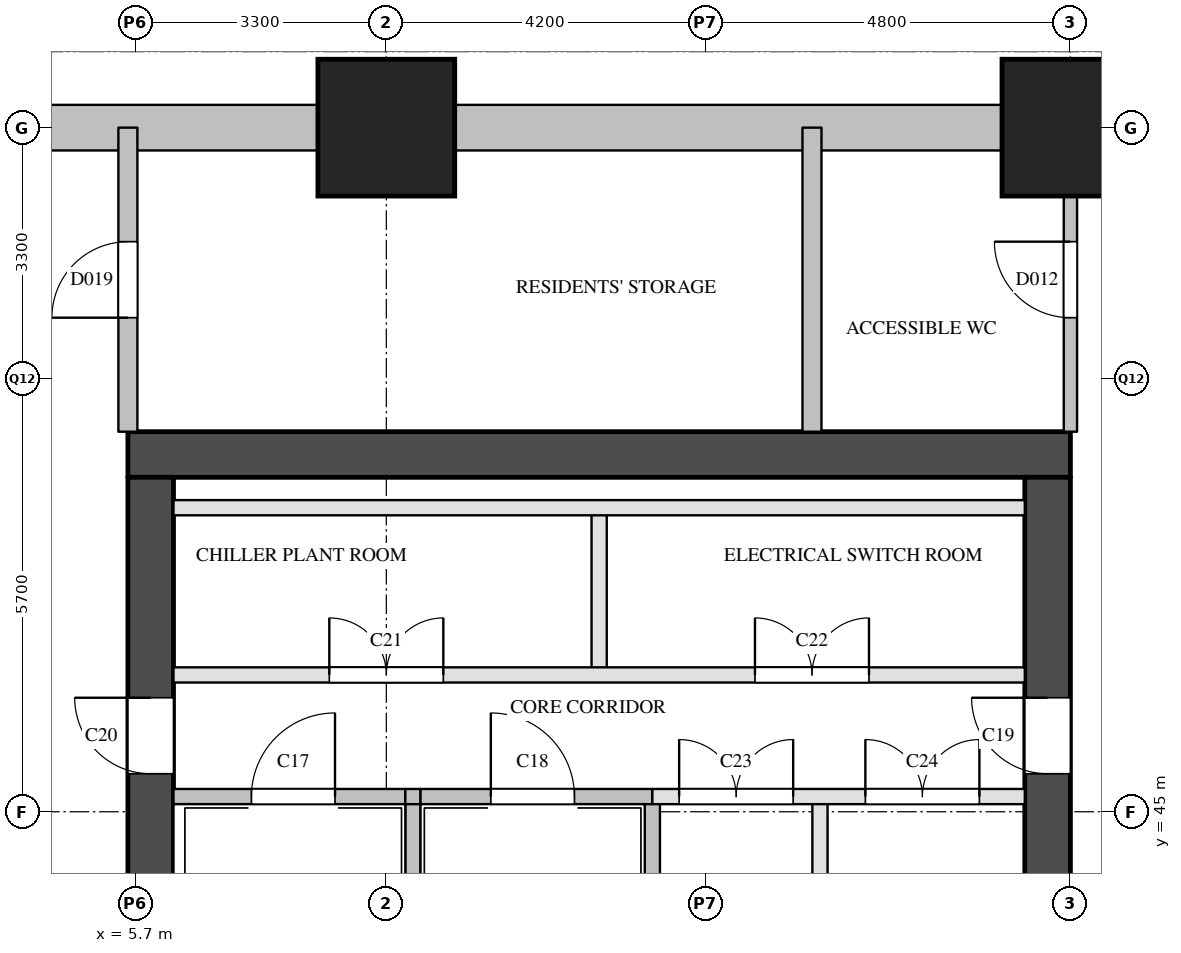
"""IFC4 building model, lengths in metres.
Left out: names, types, materials, properties, quantities, classifications, styles, units other than length and angle.
Written with IfcOpenShell. Run it as: python <this file> out.ifc"""

import sys

from ifc_helpers import new_model, si_unit, direction, frame, frame_2d, origin, origin_2d, place, context, subcontext, project, spatial, rectangle, extrude, element, fill, save


model = new_model("IFC4")
c1 = context("Model", 3, precision=1e-05, world=origin(), true_north=direction((0.0, 1.0)))
c2 = subcontext(c1, "Body", "Model", "MODEL_VIEW")
j1 = project(units=[si_unit("LENGTHUNIT", "METRE"), si_unit("PLANEANGLEUNIT", "RADIAN")], contexts=[c1])
p1 = place(None, origin())
s1 = spatial("IfcSite", under=j1, at=p1, CompositionType="ELEMENT")
p2 = place(p1, origin())
s2 = spatial("IfcBuilding", under=s1, at=p2, CompositionType="ELEMENT")
p3 = place(p2, frame((0.0, 0.0, -6.0)))
s3 = spatial("IfcBuildingStorey", under=s2, at=p3, CompositionType="ELEMENT", Elevation=-6.0)
for number, where, z_axis, x_axis in (
    (1, (9.0, 54.0, 0.0), (0.0, 0.0, 1.0), (1.0, 0.0, 0.0)),
    (2, (18.0, 54.0, 0.0), (0.0, 0.0, 1.0), (1.0, 0.0, 0.0)),
):
    element("IfcColumn", number, at=place(p3, frame(where, z_axis=z_axis, x_axis=x_axis)), inside=s3, PredefinedType="COLUMN", context=c2, shape_type="SweptSolid", body=[
        extrude(rectangle(XDim=1.8, YDim=1.8, at=origin_2d()), origin(), (0.0, 0.0, 1.0), 6.0),
    ])
p4 = place(p3, frame((17.1, 54.0, 0.0), z_axis=(0.0, 0.0, 1.0), x_axis=(-1.0, 0.0, 0.0)))
e3 = element("IfcWall", 3, at=p4, inside=s3, PredefinedType="SOLIDWALL", context=c2, shape_type="SweptSolid", body=[
    extrude(rectangle(XDim=7.2, YDim=0.6, at=frame_2d((3.6, 0.0))), origin(), (0.0, 0.0, 1.0), 5.59),
])
p5 = place(p3, frame((8.1, 54.0, 0.0), z_axis=(0.0, 0.0, 1.0), x_axis=(-1.0, 0.0, 0.0)))
e4 = element("IfcWall", 4, at=p5, inside=s3, PredefinedType="SOLIDWALL", context=c2, shape_type="SweptSolid", body=[
    extrude(rectangle(XDim=3.6, YDim=0.6, at=frame_2d((1.8, 0.0))), origin(), (0.0, 0.0, 1.0), 5.59),
])
p6 = place(p3, frame((5.6, 49.7, 0.0), z_axis=(0.0, 0.0, 1.0), x_axis=(1.0, 0.0, 0.0)))
e5 = element("IfcWall", 5, at=p6, inside=s3, PredefinedType="SHEAR", context=c2, shape_type="SweptSolid", body=[
    extrude(rectangle(XDim=12.4, YDim=0.6, at=frame_2d((6.2, 0.0))), origin(), (0.0, 0.0, 1.0), 5.59),
])
p7 = place(p3, frame((5.9, 29.1, 0.0), z_axis=(0.0, 0.0, 1.0), x_axis=(0.0, 1.0, 0.0)))
e6 = element("IfcWall", 6, at=p7, inside=s3, PredefinedType="SHEAR", context=c2, shape_type="SweptSolid", body=[
    extrude(rectangle(XDim=20.3, YDim=0.6, at=frame_2d((10.15, 0.0))), origin(), (0.0, 0.0, 1.0), 5.59),
])
p8 = place(p7, frame((16.4, 0.0, 0.0)))
e7 = element("IfcOpeningElement", 7, at=p8, cuts=e6, PredefinedType="OPENING", context=c2, shape_type="SweptSolid", body=[
    extrude(rectangle(XDim=1.0, YDim=2.1, at=frame_2d((0.5, 1.05))), frame((0.0, 0.31, 0.0), z_axis=(0.0, -1.0, 0.0), x_axis=(1.0, 0.0, 0.0)), (0.0, 0.0, 1.0), 0.62),
])
p9 = place(p3, frame((17.7, 29.1, 0.0), z_axis=(0.0, 0.0, 1.0), x_axis=(0.0, 1.0, 0.0)))
e8 = element("IfcWall", 8, at=p9, inside=s3, PredefinedType="SHEAR", context=c2, shape_type="SweptSolid", body=[
    extrude(rectangle(XDim=20.3, YDim=0.6, at=frame_2d((10.15, 0.0))), origin(), (0.0, 0.0, 1.0), 5.59),
])
p10 = place(p9, frame((1.25, 0.0, 0.0)))
e9 = element("IfcOpeningElement", 9, at=p10, cuts=e8, PredefinedType="OPENING", context=c2, shape_type="SweptSolid", body=[
    extrude(rectangle(XDim=0.7, YDim=2.1, at=frame_2d((0.35, 1.05))), frame((0.0, 0.31, 0.0), z_axis=(0.0, -1.0, 0.0), x_axis=(1.0, 0.0, 0.0)), (0.0, 0.0, 1.0), 0.62),
])
p11 = place(p9, frame((7.05, 0.0, 0.0)))
e10 = element("IfcOpeningElement", 10, at=p11, cuts=e8, PredefinedType="OPENING", context=c2, shape_type="SweptSolid", body=[
    extrude(rectangle(XDim=0.7, YDim=2.1, at=frame_2d((0.35, 1.05))), frame((0.0, 0.31, 0.0), z_axis=(0.0, -1.0, 0.0), x_axis=(1.0, 0.0, 0.0)), (0.0, 0.0, 1.0), 0.62),
])
p12 = place(p9, frame((3.6, 0.0, 0.0)))
e11 = element("IfcOpeningElement", 11, at=p12, cuts=e8, PredefinedType="OPENING", context=c2, shape_type="SweptSolid", body=[
    extrude(rectangle(XDim=1.8, YDim=2.1, at=frame_2d((0.9, 1.05))), frame((0.0, 0.31, 0.0), z_axis=(0.0, -1.0, 0.0), x_axis=(1.0, 0.0, 0.0)), (0.0, 0.0, 1.0), 0.62),
])
p13 = place(p9, frame((16.4, 0.0, 0.0)))
e12 = element("IfcOpeningElement", 12, at=p13, cuts=e8, PredefinedType="OPENING", context=c2, shape_type="SweptSolid", body=[
    extrude(rectangle(XDim=1.0, YDim=2.1, at=frame_2d((0.5, 1.05))), frame((0.0, 0.31, 0.0), z_axis=(0.0, -1.0, 0.0), x_axis=(1.0, 0.0, 0.0)), (0.0, 0.0, 1.0), 0.62),
])
p14 = place(p3, frame((9.35, 43.7, 0.0), z_axis=(0.0, 0.0, 1.0), x_axis=(0.0, 1.0, 0.0)))
e13 = element("IfcWall", 13, at=p14, inside=s3, PredefinedType="SOLIDWALL", context=c2, shape_type="SweptSolid", body=[
    extrude(rectangle(XDim=1.5, YDim=0.2, at=frame_2d((0.75, 0.0))), origin(), (0.0, 0.0, 1.0), 5.59),
])
p15 = place(p3, frame((11.8, 46.8, 0.0), z_axis=(0.0, 0.0, 1.0), x_axis=(0.0, 1.0, 0.0)))
e14 = element("IfcWall", 14, at=p15, inside=s3, PredefinedType="PARTITIONING", context=c2, shape_type="SweptSolid", body=[
    extrude(rectangle(XDim=2.2, YDim=0.2, at=frame_2d((1.1, 0.0))), origin(), (0.0, 0.0, 1.0), 5.59),
])
p16 = place(p3, frame((12.5, 43.7, 0.0), z_axis=(0.0, 0.0, 1.0), x_axis=(0.0, 1.0, 0.0)))
e15 = element("IfcWall", 15, at=p16, inside=s3, PredefinedType="SOLIDWALL", context=c2, shape_type="SweptSolid", body=[
    extrude(rectangle(XDim=1.5, YDim=0.2, at=frame_2d((0.75, 0.0))), origin(), (0.0, 0.0, 1.0), 5.59),
])
p17 = place(p3, frame((14.705, 39.0, 0.0), z_axis=(0.0, 0.0, 1.0), x_axis=(0.0, 1.0, 0.0)))
e16 = element("IfcWall", 16, at=p17, inside=s3, PredefinedType="PARTITIONING", context=c2, shape_type="SweptSolid", body=[
    extrude(rectangle(XDim=6.2, YDim=0.2, at=frame_2d((3.1, 0.0))), origin(), (0.0, 0.0, 1.0), 5.59),
])
p18 = place(p3, frame((12.5, 45.2, 0.0), z_axis=(0.0, 0.0, 1.0), x_axis=(1.0, 0.0, 0.0)))
e17 = element("IfcWall", 17, at=p18, inside=s3, PredefinedType="PARTITIONING", context=c2, shape_type="SweptSolid", body=[
    extrude(rectangle(XDim=4.9, YDim=0.2, at=frame_2d((2.45, 0.0))), origin(), (0.0, 0.0, 1.0), 5.59),
])
p19 = place(p18, frame((0.353, 0.0, 0.0)))
e18 = element("IfcOpeningElement", 18, at=p19, cuts=e17, PredefinedType="OPENING", context=c2, shape_type="SweptSolid", body=[
    extrude(rectangle(XDim=1.5, YDim=2.1, at=frame_2d((0.75, 1.05))), frame((0.0, 0.11, 0.0), z_axis=(0.0, -1.0, 0.0), x_axis=(1.0, 0.0, 0.0)), (0.0, 0.0, 1.0), 0.22),
])
p20 = place(p18, frame((2.802, 0.0, 0.0)))
e19 = element("IfcOpeningElement", 19, at=p20, cuts=e17, PredefinedType="OPENING", context=c2, shape_type="SweptSolid", body=[
    extrude(rectangle(XDim=1.5, YDim=2.1, at=frame_2d((0.75, 1.05))), frame((0.0, 0.11, 0.0), z_axis=(0.0, -1.0, 0.0), x_axis=(1.0, 0.0, 0.0)), (0.0, 0.0, 1.0), 0.22),
])
p21 = place(p3, frame((6.2, 45.2, 0.0), z_axis=(0.0, 0.0, 1.0), x_axis=(1.0, 0.0, 0.0)))
e20 = element("IfcWall", 20, at=p21, inside=s3, PredefinedType="SOLIDWALL", context=c2, shape_type="SweptSolid", body=[
    extrude(rectangle(XDim=3.05, YDim=0.2, at=frame_2d((1.525, 0.0))), origin(), (0.0, 0.0, 1.0), 5.59),
])
p22 = place(p21, frame((1.025, 0.0, 0.0)))
e21 = element("IfcOpeningElement", 21, at=p22, cuts=e20, PredefinedType="OPENING", context=c2, shape_type="SweptSolid", body=[
    extrude(rectangle(XDim=1.1, YDim=2.1, at=frame_2d((0.55, 1.05))), frame((0.0, 0.11, 0.0), z_axis=(0.0, -1.0, 0.0), x_axis=(1.0, 0.0, 0.0)), (0.0, 0.0, 1.0), 0.22),
])
p23 = place(p3, frame((9.25, 45.2, 0.0), z_axis=(0.0, 0.0, 1.0), x_axis=(1.0, 0.0, 0.0)))
e22 = element("IfcWall", 22, at=p23, inside=s3, PredefinedType="SOLIDWALL", context=c2, shape_type="SweptSolid", body=[
    extrude(rectangle(XDim=0.2, YDim=0.2, at=frame_2d((0.1, 0.0))), origin(), (0.0, 0.0, 1.0), 5.59),
])
p24 = place(p3, frame((9.45, 45.2, 0.0), z_axis=(0.0, 0.0, 1.0), x_axis=(1.0, 0.0, 0.0)))
e23 = element("IfcWall", 23, at=p24, inside=s3, PredefinedType="SOLIDWALL", context=c2, shape_type="SweptSolid", body=[
    extrude(rectangle(XDim=3.05, YDim=0.2, at=frame_2d((1.525, 0.0))), origin(), (0.0, 0.0, 1.0), 5.59),
])
p25 = place(p24, frame((0.925, 0.0, 0.0)))
e24 = element("IfcOpeningElement", 24, at=p25, cuts=e23, PredefinedType="OPENING", context=c2, shape_type="SweptSolid", body=[
    extrude(rectangle(XDim=1.1, YDim=2.1, at=frame_2d((0.55, 1.05))), frame((0.0, 0.11, 0.0), z_axis=(0.0, -1.0, 0.0), x_axis=(1.0, 0.0, 0.0)), (0.0, 0.0, 1.0), 0.22),
])
p26 = place(p3, frame((6.2, 46.8, 0.0), z_axis=(0.0, 0.0, 1.0), x_axis=(1.0, 0.0, 0.0)))
e25 = element("IfcWall", 25, at=p26, inside=s3, PredefinedType="PARTITIONING", context=c2, shape_type="SweptSolid", body=[
    extrude(rectangle(XDim=11.2, YDim=0.2, at=frame_2d((5.6, 0.0))), origin(), (0.0, 0.0, 1.0), 5.59),
])
p27 = place(p26, frame((2.05, 0.0, 0.0)))
e26 = element("IfcOpeningElement", 26, at=p27, cuts=e25, PredefinedType="OPENING", context=c2, shape_type="SweptSolid", body=[
    extrude(rectangle(XDim=1.5, YDim=2.1, at=frame_2d((0.75, 1.05))), frame((0.0, 0.11, 0.0), z_axis=(0.0, -1.0, 0.0), x_axis=(1.0, 0.0, 0.0)), (0.0, 0.0, 1.0), 0.22),
])
p28 = place(p26, frame((7.65, 0.0, 0.0)))
e27 = element("IfcOpeningElement", 27, at=p28, cuts=e25, PredefinedType="OPENING", context=c2, shape_type="SweptSolid", body=[
    extrude(rectangle(XDim=1.5, YDim=2.1, at=frame_2d((0.75, 1.05))), frame((0.0, 0.11, 0.0), z_axis=(0.0, -1.0, 0.0), x_axis=(1.0, 0.0, 0.0)), (0.0, 0.0, 1.0), 0.22),
])
p29 = place(p3, frame((6.2, 49.0, 0.0), z_axis=(0.0, 0.0, 1.0), x_axis=(1.0, 0.0, 0.0)))
e28 = element("IfcWall", 28, at=p29, inside=s3, PredefinedType="PARTITIONING", context=c2, shape_type="SweptSolid", body=[
    extrude(rectangle(XDim=11.2, YDim=0.2, at=frame_2d((5.6, 0.0))), origin(), (0.0, 0.0, 1.0), 5.59),
])
p30 = place(p3, frame((18.0, 50.0, 0.0), z_axis=(0.0, 0.0, 1.0), x_axis=(0.0, 1.0, 0.0)))
e29 = element("IfcWall", 29, at=p30, inside=s3, PredefinedType="PARTITIONING", context=c2, shape_type="SweptSolid", body=[
    extrude(rectangle(XDim=4.0, YDim=0.175, at=frame_2d((2.0, 0.0))), origin(), (0.0, 0.0, 1.0), 5.59),
])
p31 = place(p30, frame((1.5, 0.0, 0.0)))
e30 = element("IfcOpeningElement", 30, at=p31, cuts=e29, PredefinedType="OPENING", context=c2, shape_type="SweptSolid", body=[
    extrude(rectangle(XDim=1.0, YDim=2.1, at=frame_2d((0.5, 1.05))), frame((0.0, 0.097, 0.0), z_axis=(0.0, -1.0, 0.0), x_axis=(1.0, 0.0, 0.0)), (0.0, 0.0, 1.0), 0.195),
])
p32 = place(p3, frame((5.6, 50.0, 0.0), z_axis=(0.0, 0.0, 1.0), x_axis=(0.0, 1.0, 0.0)))
e31 = element("IfcWall", 31, at=p32, inside=s3, PredefinedType="PARTITIONING", context=c2, shape_type="SweptSolid", body=[
    extrude(rectangle(XDim=4.0, YDim=0.25, at=frame_2d((2.0, 0.0))), origin(), (0.0, 0.0, 1.0), 5.59),
])
p33 = place(p32, frame((1.5, 0.0, 0.0)))
e32 = element("IfcOpeningElement", 32, at=p33, cuts=e31, PredefinedType="OPENING", context=c2, shape_type="SweptSolid", body=[
    extrude(rectangle(XDim=1.0, YDim=2.1, at=frame_2d((0.5, 1.05))), frame((0.0, 0.135, 0.0), z_axis=(0.0, -1.0, 0.0), x_axis=(1.0, 0.0, 0.0)), (0.0, 0.0, 1.0), 0.27),
])
p34 = place(p3, frame((14.6, 50.0, 0.0), z_axis=(0.0, 0.0, 1.0), x_axis=(0.0, 1.0, 0.0)))
e33 = element("IfcWall", 33, at=p34, inside=s3, PredefinedType="PARTITIONING", context=c2, shape_type="SweptSolid", body=[
    extrude(rectangle(XDim=4.0, YDim=0.25, at=frame_2d((2.0, 0.0))), origin(), (0.0, 0.0, 1.0), 5.59),
])
p35 = place(p22, origin())
e34 = element("IfcDoor", 34, at=p35, inside=s3, OperationType="SINGLE_SWING_RIGHT", PredefinedType="DOOR", context=c2, shape_type="SweptSolid", body=[
    extrude(rectangle(XDim=1.1, YDim=2.1, at=frame_2d((0.55, 1.05))), frame((0.0, 0.025, 0.0), z_axis=(0.0, -1.0, 0.0), x_axis=(1.0, 0.0, 0.0)), (0.0, 0.0, 1.0), 0.05),
])
fill(e21, e34)
p36 = place(p25, origin())
e35 = element("IfcDoor", 35, at=p36, inside=s3, OperationType="SINGLE_SWING_LEFT", PredefinedType="DOOR", context=c2, shape_type="SweptSolid", body=[
    extrude(rectangle(XDim=1.1, YDim=2.1, at=frame_2d((0.55, 1.05))), frame((0.0, 0.025, 0.0), z_axis=(0.0, -1.0, 0.0), x_axis=(1.0, 0.0, 0.0)), (0.0, 0.0, 1.0), 0.05),
])
fill(e24, e35)
p37 = place(p13, origin())
e36 = element("IfcDoor", 36, at=p37, inside=s3, OperationType="SINGLE_SWING_RIGHT", PredefinedType="DOOR", context=c2, shape_type="SweptSolid", body=[
    extrude(rectangle(XDim=1.0, YDim=2.1, at=frame_2d((0.5, 1.05))), frame((0.0, 0.025, 0.0), z_axis=(0.0, -1.0, 0.0), x_axis=(1.0, 0.0, 0.0)), (0.0, 0.0, 1.0), 0.05),
])
fill(e12, e36)
p38 = place(p8, origin())
e37 = element("IfcDoor", 37, at=p38, inside=s3, OperationType="SINGLE_SWING_RIGHT", PredefinedType="DOOR", context=c2, shape_type="SweptSolid", body=[
    extrude(rectangle(XDim=1.0, YDim=2.1, at=frame_2d((0.5, 1.05))), frame((0.0, 0.025, 0.0), z_axis=(0.0, -1.0, 0.0), x_axis=(1.0, 0.0, 0.0)), (0.0, 0.0, 1.0), 0.05),
])
fill(e7, e37)
p39 = place(p27, origin())
e38 = element("IfcDoor", 38, at=p39, inside=s3, OperationType="DOUBLE_DOOR_SINGLE_SWING", PredefinedType="DOOR", context=c2, shape_type="SweptSolid", body=[
    extrude(rectangle(XDim=1.5, YDim=2.1, at=frame_2d((0.75, 1.05))), frame((0.0, 0.025, 0.0), z_axis=(0.0, -1.0, 0.0), x_axis=(1.0, 0.0, 0.0)), (0.0, 0.0, 1.0), 0.05),
])
fill(e26, e38)
p40 = place(p28, origin())
e39 = element("IfcDoor", 39, at=p40, inside=s3, OperationType="DOUBLE_DOOR_SINGLE_SWING", PredefinedType="DOOR", context=c2, shape_type="SweptSolid", body=[
    extrude(rectangle(XDim=1.5, YDim=2.1, at=frame_2d((0.75, 1.05))), frame((0.0, 0.025, 0.0), z_axis=(0.0, -1.0, 0.0), x_axis=(1.0, 0.0, 0.0)), (0.0, 0.0, 1.0), 0.05),
])
fill(e27, e39)
p41 = place(p19, origin())
e40 = element("IfcDoor", 40, at=p41, inside=s3, OperationType="DOUBLE_DOOR_SINGLE_SWING", PredefinedType="DOOR", context=c2, shape_type="SweptSolid", body=[
    extrude(rectangle(XDim=1.5, YDim=2.1, at=frame_2d((0.75, 1.05))), frame((0.0, 0.025, 0.0), z_axis=(0.0, -1.0, 0.0), x_axis=(1.0, 0.0, 0.0)), (0.0, 0.0, 1.0), 0.05),
])
fill(e18, e40)
p42 = place(p20, origin())
e41 = element("IfcDoor", 41, at=p42, inside=s3, OperationType="DOUBLE_DOOR_SINGLE_SWING", PredefinedType="DOOR", context=c2, shape_type="SweptSolid", body=[
    extrude(rectangle(XDim=1.5, YDim=2.1, at=frame_2d((0.75, 1.05))), frame((0.0, 0.025, 0.0), z_axis=(0.0, -1.0, 0.0), x_axis=(1.0, 0.0, 0.0)), (0.0, 0.0, 1.0), 0.05),
])
fill(e19, e41)
p43 = place(p31, origin())
e42 = element("IfcDoor", 42, at=p43, inside=s3, OperationType="SINGLE_SWING_RIGHT", PredefinedType="DOOR", context=c2, shape_type="SweptSolid", body=[
    extrude(rectangle(XDim=1.0, YDim=2.1, at=frame_2d((0.5, 1.05))), frame((0.0, 0.025, 0.0), z_axis=(0.0, -1.0, 0.0), x_axis=(1.0, 0.0, 0.0)), (0.0, 0.0, 1.0), 0.05),
])
fill(e30, e42)
p44 = place(p33, origin())
e43 = element("IfcDoor", 43, at=p44, inside=s3, OperationType="SINGLE_SWING_LEFT", PredefinedType="DOOR", context=c2, shape_type="SweptSolid", body=[
    extrude(rectangle(XDim=1.0, YDim=2.1, at=frame_2d((0.5, 1.05))), frame((0.0, 0.025, 0.0), z_axis=(0.0, -1.0, 0.0), x_axis=(1.0, 0.0, 0.0)), (0.0, 0.0, 1.0), 0.05),
])
fill(e32, e43)
save(model, sys.argv[1])
